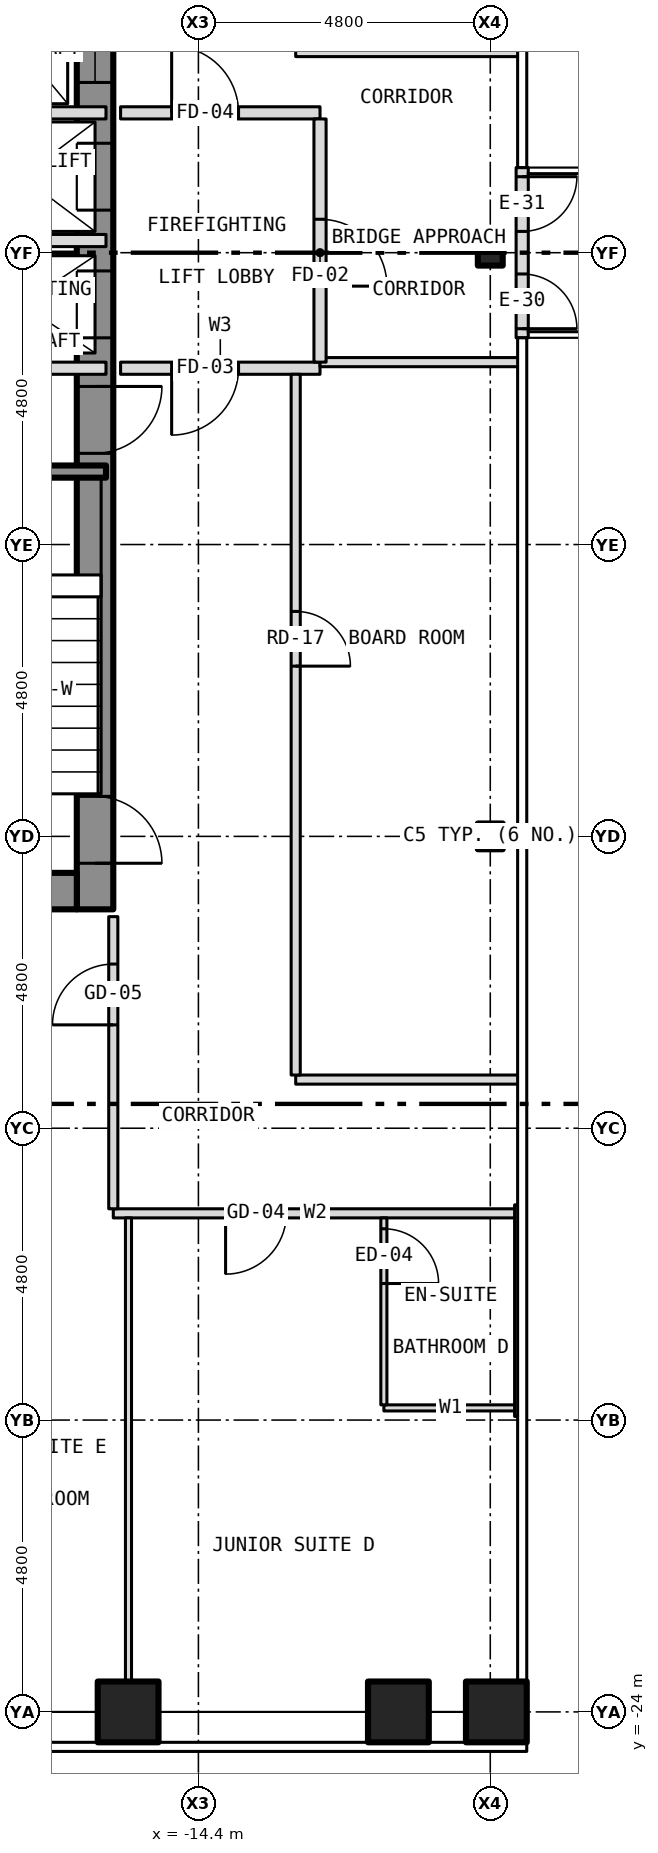
"""IFC4 building model, lengths in metres.
Left out: names, types, materials, properties, quantities, classifications, styles, units other than length and angle.
Written with IfcOpenShell. Run it as: python <this file> out.ifc"""

import sys

from ifc_helpers import new_model, si_unit, direction, frame, frame_2d, origin, origin_2d, place, context, subcontext, project, spatial, rectangle, hollow_rectangle, i_section, extrude, element, fill, save


model = new_model("IFC4")
c1 = context("Model", 3, precision=1e-05, world=origin(), true_north=direction((0.0, 1.0)))
c2 = subcontext(c1, "Body", "Model", "MODEL_VIEW")
j1 = project(units=[si_unit("LENGTHUNIT", "METRE"), si_unit("PLANEANGLEUNIT", "RADIAN")], contexts=[c1])
p1 = place(None, origin())
s1 = spatial("IfcSite", under=j1, at=p1, CompositionType="ELEMENT")
p2 = place(p1, origin())
s2 = spatial("IfcBuilding", under=s1, at=p2, CompositionType="ELEMENT")
p3 = place(p2, frame((0.0, 0.0, 70.5)))
s3 = spatial("IfcBuildingStorey", under=s2, at=p3, CompositionType="ELEMENT", Elevation=70.5)
for number, where, z_axis, x_axis in (
    (1, (-15.556, -24.0, -0.15), (0.0, 0.0, 1.0), (1.0, 0.0, 0.0)),
    (2, (-11.111, -24.0, -0.15), (0.0, 0.0, 1.0), (1.0, 0.0, 0.0)),
    (3, (-9.5, -24.0, -0.15), (0.0, 0.0, 1.0), (1.0, 0.0, 0.0)),
):
    element("IfcColumn", number, at=place(p3, frame(where, z_axis=z_axis, x_axis=x_axis)), inside=s3, PredefinedType="COLUMN", context=c2, shape_type="SweptSolid", body=[
        extrude(hollow_rectangle(XDim=1.0, YDim=1.0, WallThickness=0.06, at=origin_2d()), origin(), (0.0, 0.0, 1.0), 3.5),
    ])
for number, where, z_axis, x_axis in (
    (4, (-9.6, -9.6, -0.15), (0.0, 0.0, 1.0), (1.0, 0.0, 0.0)),
    (5, (-9.6, 0.0, -0.15), (0.0, 0.0, 1.0), (1.0, 0.0, 0.0)),
):
    element("IfcColumn", number, at=place(p3, frame(where, z_axis=z_axis, x_axis=x_axis)), inside=s3, PredefinedType="COLUMN", context=c2, shape_type="SweptSolid", body=[
        extrude(i_section(OverallWidth=0.409, OverallDepth=0.424, WebThickness=0.033, FlangeThickness=0.052, at=origin_2d()), origin(), (0.0, 0.0, 1.0), 3.5),
    ])
p4 = place(p3, frame((-16.1, -10.8, 0.0), z_axis=(0.0, 0.0, 1.0), x_axis=(0.0, 1.0, 0.0)))
e6 = element("IfcWall", 6, at=p4, inside=s3, PredefinedType="SHEAR", context=c2, shape_type="SweptSolid", body=[
    extrude(rectangle(XDim=21.6, YDim=0.6, at=frame_2d((10.8, 0.0))), origin(), (0.0, 0.0, 1.0), 3.25),
])
p5 = place(p4, frame((9.4, 0.0, 0.0)))
e7 = element("IfcOpeningElement", 7, at=p5, cuts=e6, PredefinedType="OPENING", context=c2, shape_type="SweptSolid", body=[
    extrude(rectangle(XDim=1.1, YDim=2.1, at=frame_2d((0.55, 1.05))), frame((0.0, 0.312, 0.0), z_axis=(0.0, -1.0, 0.0), x_axis=(1.0, 0.0, 0.0)), (0.0, 0.0, 1.0), 0.624),
])
p6 = place(p4, frame((11.5, 0.0, 0.0)))
e8 = element("IfcOpeningElement", 8, at=p6, cuts=e6, PredefinedType="OPENING", context=c2, shape_type="SweptSolid", body=[
    extrude(rectangle(XDim=1.1, YDim=2.1, at=frame_2d((0.55, 1.05))), frame((0.0, 0.312, 0.0), z_axis=(0.0, -1.0, 0.0), x_axis=(1.0, 0.0, 0.0)), (0.0, 0.0, 1.0), 0.624),
])
p7 = place(p4, frame((13.6, 0.0, 0.0)))
e9 = element("IfcOpeningElement", 9, at=p7, cuts=e6, PredefinedType="OPENING", context=c2, shape_type="SweptSolid", body=[
    extrude(rectangle(XDim=1.1, YDim=2.1, at=frame_2d((0.55, 1.05))), frame((0.0, 0.312, 0.0), z_axis=(0.0, -1.0, 0.0), x_axis=(1.0, 0.0, 0.0)), (0.0, 0.0, 1.0), 0.624),
])
p8 = place(p4, frame((15.7, 0.0, 0.0)))
e10 = element("IfcOpeningElement", 10, at=p8, cuts=e6, PredefinedType="OPENING", context=c2, shape_type="SweptSolid", body=[
    extrude(rectangle(XDim=1.1, YDim=2.1, at=frame_2d((0.55, 1.05))), frame((0.0, 0.312, 0.0), z_axis=(0.0, -1.0, 0.0), x_axis=(1.0, 0.0, 0.0)), (0.0, 0.0, 1.0), 0.624),
])
p9 = place(p4, frame((17.8, 0.0, 0.0)))
e11 = element("IfcOpeningElement", 11, at=p9, cuts=e6, PredefinedType="OPENING", context=c2, shape_type="SweptSolid", body=[
    extrude(rectangle(XDim=1.1, YDim=2.1, at=frame_2d((0.55, 1.05))), frame((0.0, 0.312, 0.0), z_axis=(0.0, -1.0, 0.0), x_axis=(1.0, 0.0, 0.0)), (0.0, 0.0, 1.0), 0.624),
])
p10 = place(p4, frame((0.758, 0.0, 0.0)))
e12 = element("IfcOpeningElement", 12, at=p10, cuts=e6, PredefinedType="OPENING", context=c2, shape_type="SweptSolid", body=[
    extrude(rectangle(XDim=1.1, YDim=2.1, at=frame_2d((0.55, 1.05))), frame((0.0, 0.312, 0.0), z_axis=(0.0, -1.0, 0.0), x_axis=(1.0, 0.0, 0.0)), (0.0, 0.0, 1.0), 0.624),
])
p11 = place(p4, frame((7.5, 0.0, 0.0)))
e13 = element("IfcOpeningElement", 13, at=p11, cuts=e6, PredefinedType="OPENING", context=c2, shape_type="SweptSolid", body=[
    extrude(rectangle(XDim=1.1, YDim=2.1, at=frame_2d((0.55, 1.05))), frame((0.0, 0.312, 0.0), z_axis=(0.0, -1.0, 0.0), x_axis=(1.0, 0.0, 0.0)), (0.0, 0.0, 1.0), 0.624),
])
p12 = place(p3, frame((-23.4, -10.5, 0.0), z_axis=(0.0, 0.0, 1.0), x_axis=(1.0, 0.0, 0.0)))
e14 = element("IfcWall", 14, at=p12, inside=s3, PredefinedType="SHEAR", context=c2, shape_type="SweptSolid", body=[
    extrude(rectangle(XDim=7.0, YDim=0.6, at=frame_2d((3.5, 0.0))), origin(), (0.0, 0.0, 1.0), 3.25),
])
p13 = place(p3, frame((-9.075, -1.4, 0.0), z_axis=(0.0, 0.0, 1.0), x_axis=(0.0, 1.0, 0.0)))
e15 = element("IfcWall", 15, at=p13, inside=s3, PredefinedType="SOLIDWALL", context=c2, shape_type="SweptSolid", body=[
    extrude(rectangle(XDim=2.8, YDim=0.2, at=frame_2d((1.4, 0.0))), origin(), (0.0, 0.0, 1.0), 3.5),
])
p14 = place(p13, frame((0.15, 0.0, 0.0)))
e16 = element("IfcOpeningElement", 16, at=p14, cuts=e15, PredefinedType="OPENING", context=c2, shape_type="SweptSolid", body=[
    extrude(rectangle(XDim=0.9, YDim=2.1, at=frame_2d((0.45, 1.05))), frame((0.0, 0.112, 0.0), z_axis=(0.0, -1.0, 0.0), x_axis=(1.0, 0.0, 0.0)), (0.0, 0.0, 1.0), 0.224),
])
p15 = place(p13, frame((1.75, 0.0, 0.0)))
e17 = element("IfcOpeningElement", 17, at=p15, cuts=e15, PredefinedType="OPENING", context=c2, shape_type="SweptSolid", body=[
    extrude(rectangle(XDim=0.9, YDim=2.1, at=frame_2d((0.45, 1.05))), frame((0.0, 0.112, 0.0), z_axis=(0.0, -1.0, 0.0), x_axis=(1.0, 0.0, 0.0)), (0.0, 0.0, 1.0), 0.224),
])
p16 = place(p3, frame((-11.35, -19.0, 0.0), z_axis=(0.0, 0.0, 1.0), x_axis=(1.0, 0.0, 0.0)))
e18 = element("IfcWall", 18, at=p16, inside=s3, PredefinedType="PARTITIONING", context=c2, shape_type="SweptSolid", body=[
    extrude(rectangle(XDim=2.2, YDim=0.1, at=frame_2d((1.1, 0.0))), origin(), (0.0, 0.0, 1.0), 3.35),
])
p17 = place(p3, frame((-15.8, -15.8, 0.0), z_axis=(0.0, 0.0, 1.0), x_axis=(1.0, 0.0, 0.0)))
e19 = element("IfcWall", 19, at=p17, inside=s3, PredefinedType="PARTITIONING", context=c2, shape_type="SweptSolid", body=[
    extrude(rectangle(XDim=6.65, YDim=0.15, at=frame_2d((3.325, 0.0))), origin(), (0.0, 0.0, 1.0), 3.35),
])
p18 = place(p17, frame((1.847, 0.0, 0.0)))
e20 = element("IfcOpeningElement", 20, at=p18, cuts=e19, PredefinedType="OPENING", context=c2, shape_type="SweptSolid", body=[
    extrude(rectangle(XDim=1.0, YDim=2.1, at=frame_2d((0.5, 1.05))), frame((0.0, 0.087, 0.0), z_axis=(0.0, -1.0, 0.0), x_axis=(1.0, 0.0, 0.0)), (0.0, 0.0, 1.0), 0.174),
])
p19 = place(p3, frame((-12.8, -13.6, 0.0), z_axis=(0.0, 0.0, 1.0), x_axis=(1.0, 0.0, 0.0)))
e21 = element("IfcWall", 21, at=p19, inside=s3, PredefinedType="PARTITIONING", context=c2, shape_type="SweptSolid", body=[
    extrude(rectangle(XDim=3.68, YDim=0.15, at=frame_2d((1.84, 0.0))), origin(), (0.0, 0.0, 1.0), 3.35),
])
p20 = place(p3, frame((-20.0, -3.6, 0.0), z_axis=(0.0, 0.0, 1.0), x_axis=(1.0, 0.0, 0.0)))
e22 = element("IfcWall", 22, at=p20, inside=s3, PredefinedType="SHEAR", context=c2, shape_type="SweptSolid", body=[
    extrude(rectangle(XDim=4.08, YDim=0.2, at=frame_2d((2.04, 0.0))), origin(), (0.0, 0.0, 1.0), 3.25),
])
p21 = place(p3, frame((-23.88, -1.9, 0.0), z_axis=(0.0, 0.0, 1.0), x_axis=(1.0, 0.0, 0.0)))
e23 = element("IfcWall", 23, at=p21, inside=s3, PredefinedType="PARTITIONING", context=c2, shape_type="SweptSolid", body=[
    extrude(rectangle(XDim=7.96, YDim=0.2, at=frame_2d((3.98, 0.0))), origin(), (0.0, 0.0, 1.0), 3.25),
])
p22 = place(p21, frame((3.32, 0.0, 0.0)))
e24 = element("IfcOpeningElement", 24, at=p22, cuts=e23, PredefinedType="OPENING", context=c2, shape_type="SweptSolid", body=[
    extrude(rectangle(XDim=0.9, YDim=2.1, at=frame_2d((0.45, 1.05))), frame((0.0, 0.112, 0.0), z_axis=(0.0, -1.0, 0.0), x_axis=(1.0, 0.0, 0.0)), (0.0, 0.0, 1.0), 0.224),
])
p23 = place(p3, frame((-15.68, -1.9, 0.0), z_axis=(0.0, 0.0, 1.0), x_axis=(1.0, 0.0, 0.0)))
e25 = element("IfcWall", 25, at=p23, inside=s3, PredefinedType="PARTITIONING", context=c2, shape_type="SweptSolid", body=[
    extrude(rectangle(XDim=3.28, YDim=0.2, at=frame_2d((1.64, 0.0))), origin(), (0.0, 0.0, 1.0), 3.35),
])
p24 = place(p23, frame((0.84, 0.0, 0.0)))
e26 = element("IfcOpeningElement", 26, at=p24, cuts=e25, PredefinedType="OPENING", context=c2, shape_type="SweptSolid", body=[
    extrude(rectangle(XDim=1.1, YDim=2.1, at=frame_2d((0.55, 1.05))), frame((0.0, 0.112, 0.0), z_axis=(0.0, -1.0, 0.0), x_axis=(1.0, 0.0, 0.0)), (0.0, 0.0, 1.0), 0.224),
])
p25 = place(p3, frame((-12.4, -1.8, 0.0), z_axis=(0.0, 0.0, 1.0), x_axis=(1.0, 0.0, 0.0)))
e27 = element("IfcWall", 27, at=p25, inside=s3, PredefinedType="PARTITIONING", context=c2, shape_type="SweptSolid", body=[
    extrude(rectangle(XDim=3.28, YDim=0.15, at=frame_2d((1.64, 0.0))), origin(), (0.0, 0.0, 1.0), 3.35),
])
for number, where, z_axis, x_axis in (
    (28, (-18.8, 0.2, 0.0), (0.0, 0.0, 1.0), (1.0, 0.0, 0.0)),
    (29, (-18.8, 2.3, 0.0), (0.0, 0.0, 1.0), (1.0, 0.0, 0.0)),
):
    element("IfcWall", number, at=place(p3, frame(where, z_axis=z_axis, x_axis=x_axis)), inside=s3, PredefinedType="PARTITIONING", context=c2, shape_type="SweptSolid", body=[
        extrude(rectangle(XDim=2.88, YDim=0.2, at=frame_2d((1.44, 0.0))), origin(), (0.0, 0.0, 1.0), 3.25),
    ])
p26 = place(p3, frame((-15.68, 2.3, 0.0), z_axis=(0.0, 0.0, 1.0), x_axis=(1.0, 0.0, 0.0)))
e30 = element("IfcWall", 30, at=p26, inside=s3, PredefinedType="PARTITIONING", context=c2, shape_type="SweptSolid", body=[
    extrude(rectangle(XDim=3.28, YDim=0.2, at=frame_2d((1.64, 0.0))), origin(), (0.0, 0.0, 1.0), 3.35),
])
p27 = place(p26, frame((0.84, 0.0, 0.0)))
e31 = element("IfcOpeningElement", 31, at=p27, cuts=e30, PredefinedType="OPENING", context=c2, shape_type="SweptSolid", body=[
    extrude(rectangle(XDim=1.1, YDim=2.1, at=frame_2d((0.55, 1.05))), frame((0.0, 0.112, 0.0), z_axis=(0.0, -1.0, 0.0), x_axis=(1.0, 0.0, 0.0)), (0.0, 0.0, 1.0), 0.224),
])
p28 = place(p3, frame((-12.8, 3.3, 0.0), z_axis=(0.0, 0.0, 1.0), x_axis=(1.0, 0.0, 0.0)))
e32 = element("IfcWall", 32, at=p28, inside=s3, PredefinedType="PARTITIONING", context=c2, shape_type="SweptSolid", body=[
    extrude(rectangle(XDim=3.68, YDim=0.15, at=frame_2d((1.84, 0.0))), origin(), (0.0, 0.0, 1.0), 3.35),
])
p29 = place(p3, frame((-15.8, -15.725, 0.0), z_axis=(0.0, 0.0, 1.0), x_axis=(0.0, 1.0, 0.0)))
e33 = element("IfcWall", 33, at=p29, inside=s3, PredefinedType="PARTITIONING", context=c2, shape_type="SweptSolid", body=[
    extrude(rectangle(XDim=4.805, YDim=0.15, at=frame_2d((2.403, 0.0))), origin(), (0.0, 0.0, 1.0), 3.35),
])
p30 = place(p29, frame((3.025, 0.0, 0.0)))
e34 = element("IfcOpeningElement", 34, at=p30, cuts=e33, PredefinedType="OPENING", context=c2, shape_type="SweptSolid", body=[
    extrude(rectangle(XDim=1.0, YDim=2.1, at=frame_2d((0.5, 1.05))), frame((0.0, 0.087, 0.0), z_axis=(0.0, -1.0, 0.0), x_axis=(1.0, 0.0, 0.0)), (0.0, 0.0, 1.0), 0.174),
])
p31 = place(p3, frame((-15.55, -23.88, 0.0), z_axis=(0.0, 0.0, 1.0), x_axis=(0.0, 1.0, 0.0)))
e35 = element("IfcWall", 35, at=p31, inside=s3, PredefinedType="PARTITIONING", context=c2, shape_type="SweptSolid", body=[
    extrude(rectangle(XDim=8.005, YDim=0.1, at=frame_2d((4.002, 0.0))), origin(), (0.0, 0.0, 1.0), 3.35),
])
p32 = place(p3, frame((-12.8, -13.525, 0.0), z_axis=(0.0, 0.0, 1.0), x_axis=(0.0, 1.0, 0.0)))
e36 = element("IfcWall", 36, at=p32, inside=s3, PredefinedType="PARTITIONING", context=c2, shape_type="SweptSolid", body=[
    extrude(rectangle(XDim=11.525, YDim=0.15, at=frame_2d((5.762, 0.0))), origin(), (0.0, 0.0, 1.0), 3.35),
])
p33 = place(p32, frame((6.725, 0.0, 0.0)))
e37 = element("IfcOpeningElement", 37, at=p33, cuts=e36, PredefinedType="OPENING", context=c2, shape_type="SweptSolid", body=[
    extrude(rectangle(XDim=0.9, YDim=2.1, at=frame_2d((0.45, 1.05))), frame((0.0, 0.087, 0.0), z_axis=(0.0, -1.0, 0.0), x_axis=(1.0, 0.0, 0.0)), (0.0, 0.0, 1.0), 0.174),
])
p34 = place(p3, frame((-12.4, -1.8, 0.0), z_axis=(0.0, 0.0, 1.0), x_axis=(0.0, 1.0, 0.0)))
e38 = element("IfcWall", 38, at=p34, inside=s3, PredefinedType="PARTITIONING", context=c2, shape_type="SweptSolid", body=[
    extrude(rectangle(XDim=4.0, YDim=0.2, at=frame_2d((2.0, 0.0))), origin(), (0.0, 0.0, 1.0), 3.35),
])
p35 = place(p34, frame((1.25, 0.0, 0.0)))
e39 = element("IfcOpeningElement", 39, at=p35, cuts=e38, PredefinedType="OPENING", context=c2, shape_type="SweptSolid", body=[
    extrude(rectangle(XDim=1.1, YDim=2.1, at=frame_2d((0.55, 1.05))), frame((0.0, 0.112, 0.0), z_axis=(0.0, -1.0, 0.0), x_axis=(1.0, 0.0, 0.0)), (0.0, 0.0, 1.0), 0.224),
])
p36 = place(p3, frame((-11.35, -18.95, 0.0), z_axis=(0.0, 0.0, 1.0), x_axis=(0.0, 1.0, 0.0)))
e40 = element("IfcWall", 40, at=p36, inside=s3, PredefinedType="PARTITIONING", context=c2, shape_type="SweptSolid", body=[
    extrude(rectangle(XDim=3.075, YDim=0.1, at=frame_2d((1.538, 0.0))), origin(), (0.0, 0.0, 1.0), 3.35),
])
p37 = place(p36, frame((1.996, 0.0, 0.0)))
e41 = element("IfcOpeningElement", 41, at=p37, cuts=e40, PredefinedType="OPENING", context=c2, shape_type="SweptSolid", body=[
    extrude(rectangle(XDim=0.9, YDim=2.1, at=frame_2d((0.45, 1.05))), frame((0.0, 0.062, 0.0), z_axis=(0.0, -1.0, 0.0), x_axis=(1.0, 0.0, 0.0)), (0.0, 0.0, 1.0), 0.124),
])
p38 = place(p3, frame((-9.15, -19.14, 0.0), z_axis=(0.0, 0.0, 1.0), x_axis=(0.0, 1.0, 0.0)))
e42 = element("IfcWall", 42, at=p38, inside=s3, PredefinedType="PARTITIONING", context=c2, shape_type="SweptSolid", body=[
    extrude(rectangle(XDim=3.48, YDim=0.1, at=frame_2d((1.74, 0.0))), origin(), (0.0, 0.0, 1.0), 2.733),
])
p39 = place(p14, origin())
e43 = element("IfcDoor", 43, at=p39, inside=s3, OperationType="SINGLE_SWING_LEFT", PredefinedType="DOOR", context=c2, shape_type="SweptSolid", body=[
    extrude(rectangle(XDim=0.9, YDim=2.1, at=frame_2d((0.45, 1.05))), frame((0.0, 0.025, 0.0), z_axis=(0.0, -1.0, 0.0), x_axis=(1.0, 0.0, 0.0)), (0.0, 0.0, 1.0), 0.05),
])
fill(e16, e43)
p40 = place(p15, origin())
e44 = element("IfcDoor", 44, at=p40, inside=s3, OperationType="SINGLE_SWING_RIGHT", PredefinedType="DOOR", context=c2, shape_type="SweptSolid", body=[
    extrude(rectangle(XDim=0.9, YDim=2.1, at=frame_2d((0.45, 1.05))), frame((0.0, 0.025, 0.0), z_axis=(0.0, -1.0, 0.0), x_axis=(1.0, 0.0, 0.0)), (0.0, 0.0, 1.0), 0.05),
])
fill(e17, e44)
p41 = place(p5, origin())
e45 = element("IfcDoor", 45, at=p41, inside=s3, OperationType="SLIDING_TO_LEFT", PredefinedType="DOOR", context=c2, shape_type="SweptSolid", body=[
    extrude(rectangle(XDim=1.1, YDim=2.1, at=frame_2d((0.55, 1.05))), frame((0.0, 0.025, 0.0), z_axis=(0.0, -1.0, 0.0), x_axis=(1.0, 0.0, 0.0)), (0.0, 0.0, 1.0), 0.05),
])
fill(e7, e45)
p42 = place(p6, origin())
e46 = element("IfcDoor", 46, at=p42, inside=s3, OperationType="SLIDING_TO_LEFT", PredefinedType="DOOR", context=c2, shape_type="SweptSolid", body=[
    extrude(rectangle(XDim=1.1, YDim=2.1, at=frame_2d((0.55, 1.05))), frame((0.0, 0.025, 0.0), z_axis=(0.0, -1.0, 0.0), x_axis=(1.0, 0.0, 0.0)), (0.0, 0.0, 1.0), 0.05),
])
fill(e8, e46)
p43 = place(p7, origin())
e47 = element("IfcDoor", 47, at=p43, inside=s3, OperationType="SLIDING_TO_LEFT", PredefinedType="DOOR", context=c2, shape_type="SweptSolid", body=[
    extrude(rectangle(XDim=1.1, YDim=2.1, at=frame_2d((0.55, 1.05))), frame((0.0, 0.025, 0.0), z_axis=(0.0, -1.0, 0.0), x_axis=(1.0, 0.0, 0.0)), (0.0, 0.0, 1.0), 0.05),
])
fill(e9, e47)
p44 = place(p10, origin())
e48 = element("IfcDoor", 48, at=p44, inside=s3, OperationType="SINGLE_SWING_LEFT", PredefinedType="DOOR", context=c2, shape_type="SweptSolid", body=[
    extrude(rectangle(XDim=1.1, YDim=2.1, at=frame_2d((0.55, 1.05))), frame((0.0, 0.025, 0.0), z_axis=(0.0, -1.0, 0.0), x_axis=(1.0, 0.0, 0.0)), (0.0, 0.0, 1.0), 0.05),
])
fill(e12, e48)
p45 = place(p11, origin())
e49 = element("IfcDoor", 49, at=p45, inside=s3, OperationType="SINGLE_SWING_RIGHT", PredefinedType="DOOR", context=c2, shape_type="SweptSolid", body=[
    extrude(rectangle(XDim=1.1, YDim=2.1, at=frame_2d((0.55, 1.05))), frame((0.0, 0.025, 0.0), z_axis=(0.0, -1.0, 0.0), x_axis=(1.0, 0.0, 0.0)), (0.0, 0.0, 1.0), 0.05),
])
fill(e13, e49)
p46 = place(p35, origin())
e50 = element("IfcDoor", 50, at=p46, inside=s3, OperationType="SINGLE_SWING_LEFT", PredefinedType="DOOR", context=c2, shape_type="SweptSolid", body=[
    extrude(rectangle(XDim=1.1, YDim=2.1, at=frame_2d((0.55, 1.05))), frame((0.0, 0.025, 0.0), z_axis=(0.0, -1.0, 0.0), x_axis=(1.0, 0.0, 0.0)), (0.0, 0.0, 1.0), 0.05),
])
fill(e39, e50)
p47 = place(p24, origin())
e51 = element("IfcDoor", 51, at=p47, inside=s3, OperationType="SINGLE_SWING_LEFT", PredefinedType="DOOR", context=c2, shape_type="SweptSolid", body=[
    extrude(rectangle(XDim=1.1, YDim=2.1, at=frame_2d((0.55, 1.05))), frame((0.0, 0.025, 0.0), z_axis=(0.0, -1.0, 0.0), x_axis=(1.0, 0.0, 0.0)), (0.0, 0.0, 1.0), 0.05),
])
fill(e26, e51)
p48 = place(p27, origin())
e52 = element("IfcDoor", 52, at=p48, inside=s3, OperationType="SINGLE_SWING_LEFT", PredefinedType="DOOR", context=c2, shape_type="SweptSolid", body=[
    extrude(rectangle(XDim=1.1, YDim=2.1, at=frame_2d((0.55, 1.05))), frame((0.0, 0.025, 0.0), z_axis=(0.0, -1.0, 0.0), x_axis=(1.0, 0.0, 0.0)), (0.0, 0.0, 1.0), 0.05),
])
fill(e31, e52)
p49 = place(p18, origin())
e53 = element("IfcDoor", 53, at=p49, inside=s3, OperationType="SINGLE_SWING_LEFT", PredefinedType="DOOR", context=c2, shape_type="SweptSolid", body=[
    extrude(rectangle(XDim=1.0, YDim=2.1, at=frame_2d((0.5, 1.05))), frame((0.0, 0.025, 0.0), z_axis=(0.0, -1.0, 0.0), x_axis=(1.0, 0.0, 0.0)), (0.0, 0.0, 1.0), 0.05),
])
fill(e20, e53)
p50 = place(p37, origin())
e54 = element("IfcDoor", 54, at=p50, inside=s3, OperationType="SINGLE_SWING_LEFT", PredefinedType="DOOR", context=c2, shape_type="SweptSolid", body=[
    extrude(rectangle(XDim=0.9, YDim=2.1, at=frame_2d((0.45, 1.05))), frame((0.0, 0.025, 0.0), z_axis=(0.0, -1.0, 0.0), x_axis=(1.0, 0.0, 0.0)), (0.0, 0.0, 1.0), 0.05),
])
fill(e41, e54)
p51 = place(p30, origin())
e55 = element("IfcDoor", 55, at=p51, inside=s3, OperationType="SINGLE_SWING_LEFT", PredefinedType="DOOR", context=c2, shape_type="SweptSolid", body=[
    extrude(rectangle(XDim=1.0, YDim=2.1, at=frame_2d((0.5, 1.05))), frame((0.0, 0.025, 0.0), z_axis=(0.0, -1.0, 0.0), x_axis=(1.0, 0.0, 0.0)), (0.0, 0.0, 1.0), 0.05),
])
fill(e34, e55)
p52 = place(p33, origin())
e56 = element("IfcDoor", 56, at=p52, inside=s3, OperationType="SINGLE_SWING_LEFT", PredefinedType="DOOR", context=c2, shape_type="SweptSolid", body=[
    extrude(rectangle(XDim=0.9, YDim=2.1, at=frame_2d((0.45, 1.05))), frame((0.0, 0.025, 0.0), z_axis=(0.0, -1.0, 0.0), x_axis=(1.0, 0.0, 0.0)), (0.0, 0.0, 1.0), 0.05),
])
fill(e37, e56)
save(model, sys.argv[1])
